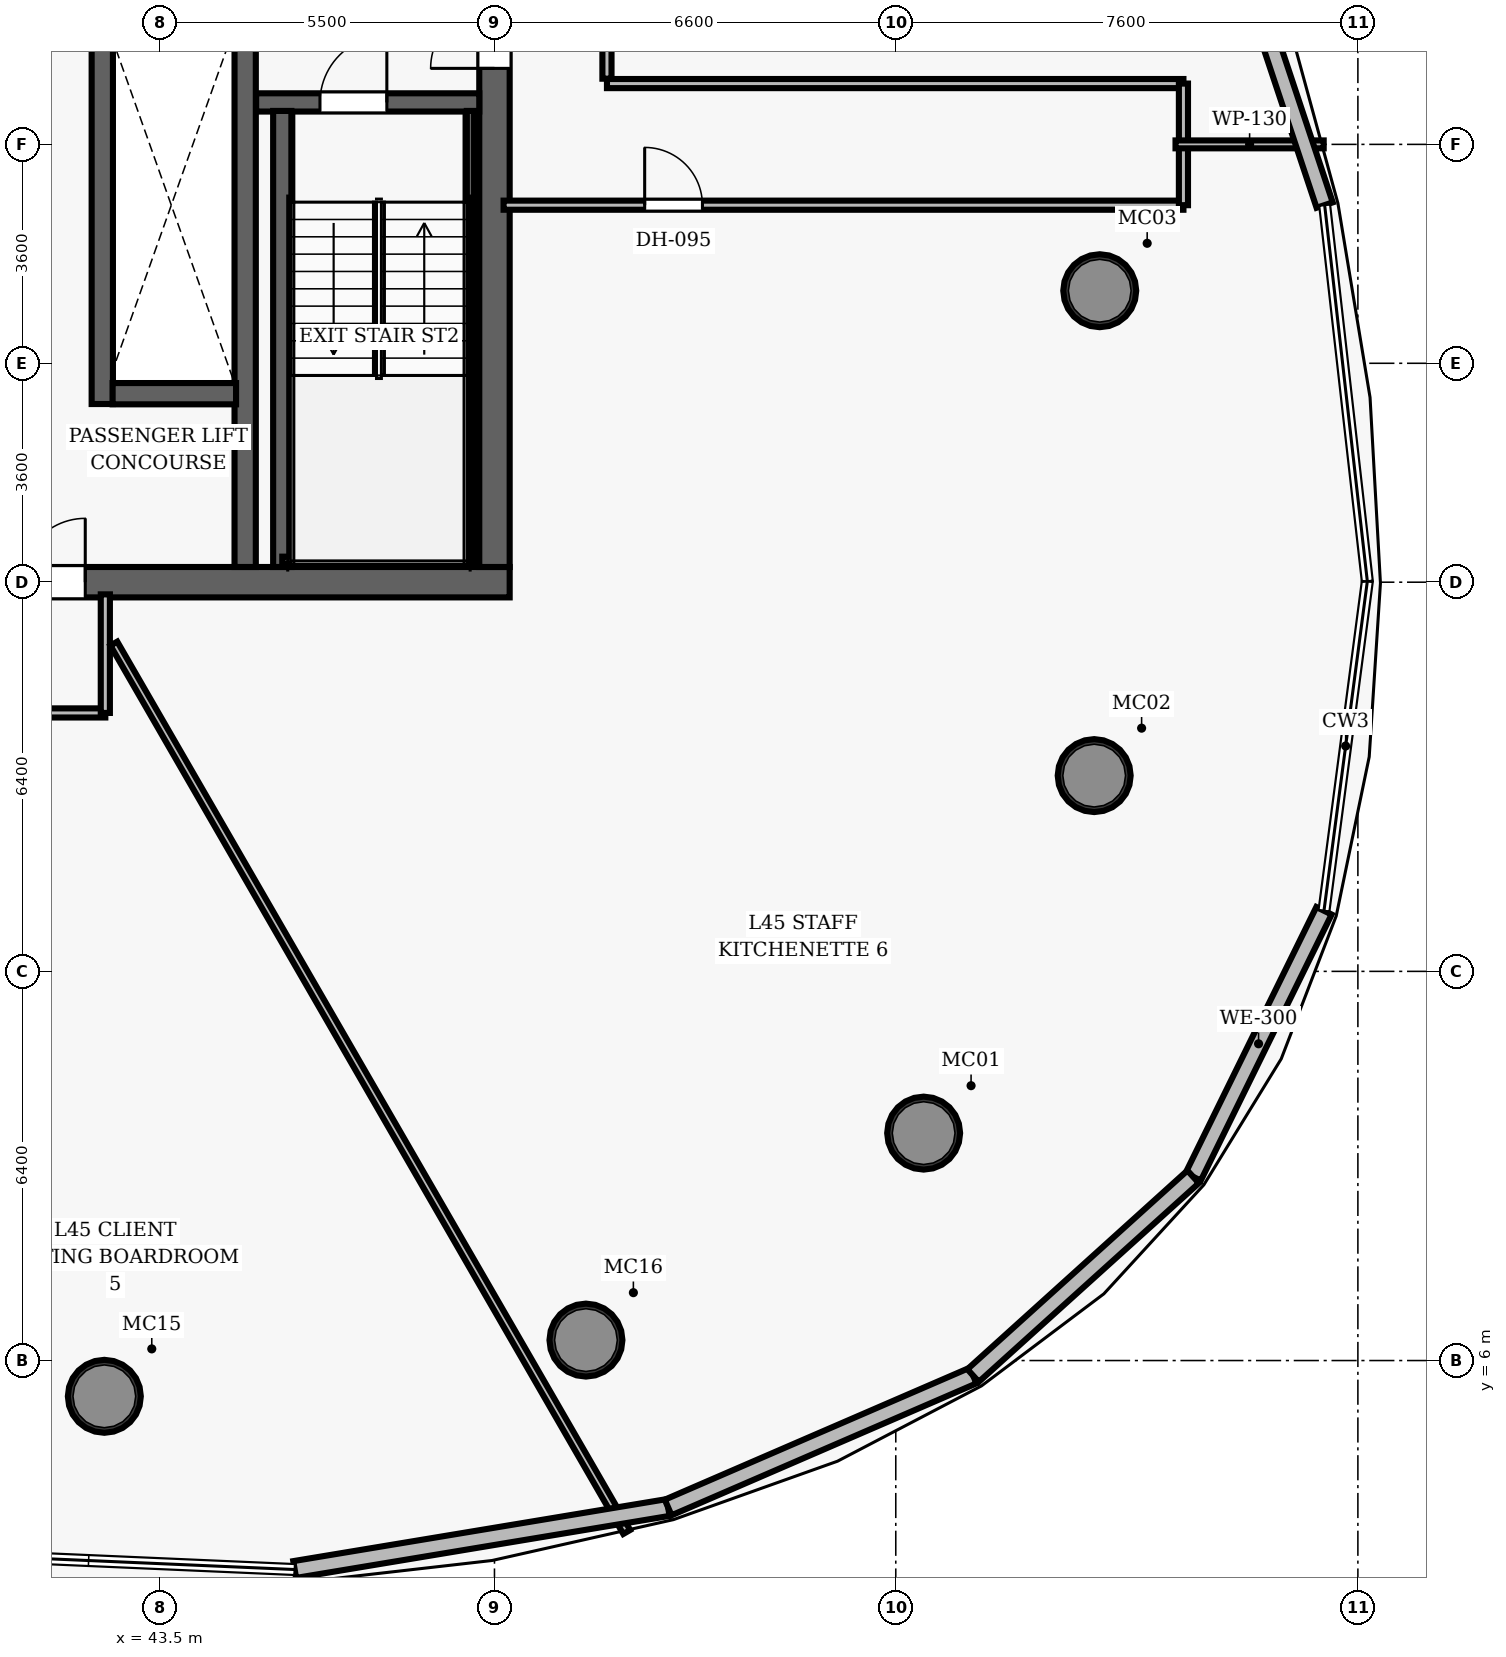
"""IFC4 building model, lengths in metres.
Left out: names, types, materials, properties, quantities, classifications, styles, units other than length and angle.
Written with IfcOpenShell. Run it as: python <this file> out.ifc"""

import sys

from ifc_helpers import new_model, si_unit, direction, frame, frame_2d, origin, origin_2d, place, context, subcontext, project, spatial, rectangle, hollow_circle, extrude, element, fill, save


model = new_model("IFC4")
c1 = context("Model", 3, precision=1e-05, world=origin(), true_north=direction((0.0, 1.0)))
c2 = subcontext(c1, "Body", "Model", "MODEL_VIEW")
j1 = project(units=[si_unit("LENGTHUNIT", "METRE"), si_unit("PLANEANGLEUNIT", "RADIAN")], contexts=[c1])
p1 = place(None, origin())
s1 = spatial("IfcSite", under=j1, at=p1, CompositionType="ELEMENT")
p2 = place(p1, origin())
s2 = spatial("IfcBuilding", under=s1, at=p2, CompositionType="ELEMENT")
p3 = place(p2, frame((0.0, 0.0, 178.9)))
s3 = spatial("IfcBuildingStorey", under=s2, at=p3, CompositionType="ELEMENT", Elevation=178.9)
p4 = place(p3, frame((26.75, 18.8, 0.0), z_axis=(0.0, 0.0, 1.0), x_axis=(1.0, 0.0, 0.0)))
e1 = element("IfcWall", 1, at=p4, inside=s3, PredefinedType="SHEAR", context=c2, shape_type="SweptSolid", body=[
    extrude(rectangle(XDim=22.5, YDim=0.5, at=frame_2d((11.25, 0.0))), origin(), (0.0, 0.0, 1.0), 3.85),
])
p5 = place(p4, frame((14.47, 0.0, 0.0)))
e2 = element("IfcOpeningElement", 2, at=p5, cuts=e1, PredefinedType="OPENING", context=c2, shape_type="SweptSolid", body=[
    extrude(rectangle(XDim=1.05, YDim=2.15, at=frame_2d((0.525, 1.075))), frame((0.0, 0.26, 0.0), z_axis=(0.0, -1.0, 0.0), x_axis=(1.0, 0.0, 0.0)), (0.0, 0.0, 1.0), 0.52),
])
p6 = place(p3, frame((49.0, 19.05, 0.0), z_axis=(0.0, 0.0, 1.0), x_axis=(0.0, 1.0, 0.0)))
e3 = element("IfcWall", 3, at=p6, inside=s3, PredefinedType="SHEAR", context=c2, shape_type="SweptSolid", body=[
    extrude(rectangle(XDim=13.9, YDim=0.5, at=frame_2d((6.95, 0.0))), origin(), (0.0, 0.0, 1.0), 3.85),
])
p7 = place(p6, frame((8.2, 0.0, 0.0)))
e4 = element("IfcOpeningElement", 4, at=p7, cuts=e3, PredefinedType="OPENING", context=c2, shape_type="SweptSolid", body=[
    extrude(rectangle(XDim=1.05, YDim=2.15, at=frame_2d((0.525, 1.075))), frame((0.0, 0.26, 0.0), z_axis=(0.0, -1.0, 0.0), x_axis=(1.0, 0.0, 0.0)), (0.0, 0.0, 1.0), 0.52),
])
p8 = place(p3, frame((44.9, 19.05, 0.0), z_axis=(0.0, 0.0, 1.0), x_axis=(0.0, 1.0, 0.0)))
e5 = element("IfcWall", 5, at=p8, inside=s3, PredefinedType="SHEAR", context=c2, shape_type="SweptSolid", body=[
    extrude(rectangle(XDim=13.9, YDim=0.35, at=frame_2d((6.95, 0.0))), origin(), (0.0, 0.0, 1.0), 3.85),
])
for number, where, z_axis, x_axis in (
    (6, (56.058, 9.74, 0.0), (0.0, 0.0, 1.0), (1.0, 0.0, 0.0)),
    (7, (58.863, 15.619, 0.0), (0.0, 0.0, 1.0), (1.0, 0.0, 0.0)),
    (8, (58.955, 23.594, 0.0), (0.0, 0.0, 1.0), (1.0, 0.0, 0.0)),
    (9, (42.584, 5.412, 0.0), (0.0, 0.0, 1.0), (1.0, 0.0, 0.0)),
    (10, (50.504, 6.336, 0.0), (0.0, 0.0, 1.0), (1.0, 0.0, 0.0)),
):
    element("IfcColumn", number, at=place(p3, frame(where, z_axis=z_axis, x_axis=x_axis)), inside=s3, PredefinedType="COLUMN", context=c2, shape_type="SweptSolid", body=[
        extrude(hollow_circle(Radius=0.6, WallThickness=0.05, at=origin_2d()), origin(), (0.0, 0.0, 1.0), 3.85),
    ])
p9 = place(p3, frame((45.08, 26.69, 0.0), z_axis=(0.0, 0.0, 1.0), x_axis=(1.0, 0.0, 0.0)))
e11 = element("IfcWall", 11, at=p9, inside=s3, PredefinedType="SHEAR", context=c2, shape_type="SweptSolid", body=[
    extrude(rectangle(XDim=3.67, YDim=0.3, at=frame_2d((1.835, 0.0))), origin(), (0.0, 0.0, 1.0), 3.85),
])
p10 = place(p9, frame((1.05, 0.0, 0.0)))
e12 = element("IfcOpeningElement", 12, at=p10, cuts=e11, PredefinedType="OPENING", context=c2, shape_type="SweptSolid", body=[
    extrude(rectangle(XDim=1.1, YDim=2.15, at=frame_2d((0.55, 1.075))), frame((0.0, 0.16, 0.0), z_axis=(0.0, -1.0, 0.0), x_axis=(1.0, 0.0, 0.0)), (0.0, 0.0, 1.0), 0.32),
])
p11 = place(p3, frame((45.51, 19.05, 0.0), z_axis=(0.0, 0.0, 1.0), x_axis=(0.0, 1.0, 0.0)))
e13 = element("IfcWall", 13, at=p11, inside=s3, PredefinedType="SHEAR", context=c2, shape_type="SweptSolid", body=[
    extrude(rectangle(XDim=7.5, YDim=0.3, at=frame_2d((3.75, 0.0))), origin(), (0.0, 0.0, 1.0), 3.85),
])
p12 = place(p3, frame((48.605, 19.1, 0.0), z_axis=(0.0, 0.0, 1.0), x_axis=(0.0, 1.0, 0.0)))
e14 = element("IfcWall", 14, at=p12, inside=s3, PredefinedType="SHEAR", context=c2, shape_type="SweptSolid", body=[
    extrude(rectangle(XDim=7.45, YDim=0.12, at=frame_2d((3.725, 0.0))), origin(), (0.0, 0.0, 1.0), 3.85),
])
p13 = place(p3, frame((45.51, 19.16, 0.0), z_axis=(0.0, 0.0, 1.0), x_axis=(1.0, 0.0, 0.0)))
e15 = element("IfcWall", 15, at=p13, inside=s3, PredefinedType="SHEAR", context=c2, shape_type="SweptSolid", body=[
    extrude(rectangle(XDim=3.095, YDim=0.12, at=frame_2d((1.547, 0.0))), origin(), (0.0, 0.0, 1.0), 3.85),
])
p14 = place(p3, frame((42.55, 21.73, 0.0), z_axis=(0.0, 0.0, 1.0), x_axis=(0.0, 1.0, 0.0)))
e16 = element("IfcWall", 16, at=p14, inside=s3, PredefinedType="SHEAR", context=c2, shape_type="SweptSolid", body=[
    extrude(rectangle(XDim=6.54, YDim=0.35, at=frame_2d((3.27, 0.0))), origin(), (0.0, 0.0, 1.0), 3.035),
])
p15 = place(p3, frame((42.72, 21.9, 0.0), z_axis=(0.0, 0.0, 1.0), x_axis=(1.0, 0.0, 0.0)))
e17 = element("IfcWall", 17, at=p15, inside=s3, PredefinedType="SHEAR", context=c2, shape_type="SweptSolid", body=[
    extrude(rectangle(XDim=2.03, YDim=0.35, at=frame_2d((1.015, 0.0))), origin(), (0.0, 0.0, 1.0), 3.035),
])
p16 = place(p3, frame((50.85, 27.08, 0.0), z_axis=(0.0, 0.0, 1.0), x_axis=(0.0, 1.0, 0.0)))
e18 = element("IfcWall", 18, at=p16, inside=s3, PredefinedType="PARTITIONING", context=c2, shape_type="SweptSolid", body=[
    extrude(rectangle(XDim=8.12, YDim=0.15, at=frame_2d((4.06, 0.0))), origin(), (0.0, 0.0, 1.0), 3.035),
])
p17 = place(p3, frame((50.85, 27.0, 0.0), z_axis=(0.0, 0.0, 1.0), x_axis=(1.0, 0.0, 0.0)))
e19 = element("IfcWall", 19, at=p17, inside=s3, PredefinedType="PARTITIONING", context=c2, shape_type="SweptSolid", body=[
    extrude(rectangle(XDim=9.481, YDim=0.15, at=frame_2d((4.74, 0.0))), origin(), (0.0, 0.0, 1.0), 3.035),
])
p18 = place(p3, frame((49.15, 25.0, 0.0), z_axis=(0.0, 0.0, 1.0), x_axis=(1.0, 0.0, 0.0)))
e20 = element("IfcWall", 20, at=p18, inside=s3, PredefinedType="PARTITIONING", context=c2, shape_type="SweptSolid", body=[
    extrude(rectangle(XDim=11.181, YDim=0.15, at=frame_2d((5.591, 0.0))), origin(), (0.0, 0.0, 1.0), 3.035),
])
p19 = place(p18, frame((2.32, 0.0, 0.0)))
e21 = element("IfcOpeningElement", 21, at=p19, cuts=e20, PredefinedType="OPENING", context=c2, shape_type="SweptSolid", body=[
    extrude(rectangle(XDim=0.95, YDim=2.15, at=frame_2d((0.475, 1.075))), frame((0.0, 0.085, 0.0), z_axis=(0.0, -1.0, 0.0), x_axis=(1.0, 0.0, 0.0)), (0.0, 0.0, 1.0), 0.17),
])
p20 = place(p3, frame((60.331, 25.0, 0.0), z_axis=(0.0, 0.0, 1.0), x_axis=(0.0, 1.0, 0.0)))
e22 = element("IfcWall", 22, at=p20, inside=s3, PredefinedType="PARTITIONING", context=c2, shape_type="SweptSolid", body=[
    extrude(rectangle(XDim=2.0, YDim=0.15, at=frame_2d((1.0, 0.0))), origin(), (0.0, 0.0, 1.0), 3.035),
])
p21 = place(p3, frame((39.05, 16.65, 0.0), z_axis=(0.0, 0.0, 1.0), x_axis=(1.0, 0.0, 0.0)))
e23 = element("IfcWall", 23, at=p21, inside=s3, PredefinedType="PARTITIONING", context=c2, shape_type="SweptSolid", body=[
    extrude(rectangle(XDim=3.55, YDim=0.15, at=frame_2d((1.775, 0.0))), origin(), (0.0, 0.0, 1.0), 3.035),
])
p22 = place(p3, frame((42.6, 16.65, 0.0), z_axis=(0.0, 0.0, 1.0), x_axis=(0.0, 1.0, 0.0)))
e24 = element("IfcWall", 24, at=p22, inside=s3, PredefinedType="PARTITIONING", context=c2, shape_type="SweptSolid", body=[
    extrude(rectangle(XDim=1.95, YDim=0.15, at=frame_2d((0.975, 0.0))), origin(), (0.0, 0.0, 1.0), 3.035),
])
p23 = place(p3, frame((60.201, 26.0, 0.0), z_axis=(0.0, 0.0, 1.0), x_axis=(1.0, 0.0, 0.0)))
e25 = element("IfcWall", 25, at=p23, inside=s3, PredefinedType="PARTITIONING", context=c2, shape_type="SweptSolid", body=[
    extrude(rectangle(XDim=2.437, YDim=0.13, at=frame_2d((1.219, 0.0))), origin(), (0.0, 0.0, 1.0), 3.035),
])
p24 = place(p3, frame((42.74, 17.79, 0.0), z_axis=(0.0, 0.0, 1.0), x_axis=(0.500003906344, -0.866023148444, 0.0)))
e26 = element("IfcWall", 26, at=p24, inside=s3, PredefinedType="PARTITIONING", context=c2, shape_type="SweptSolid", body=[
    extrude(rectangle(XDim=16.869, YDim=0.13, at=frame_2d((8.435, 0.0))), origin(), (0.0, 0.0, 1.0), 3.035),
])
p25 = place(p3, frame((62.642, 13.397, 0.0), z_axis=(0.0, 0.0, 1.0), x_axis=(-0.441235718271, -0.897391241835, 0.0)))
e27 = element("IfcWall", 27, at=p25, inside=s3, PredefinedType="SOLIDWALL", context=c2, shape_type="SweptSolid", body=[
    extrude(rectangle(XDim=4.876, YDim=0.28, at=frame_2d((2.438, 0.0))), origin(), (0.0, 0.0, 1.0), 3.62),
])
p26 = place(p3, frame((60.512, 31.439, 0.0), z_axis=(0.0, 0.0, 1.0), x_axis=(0.315590755591, -0.948895397283, 0.0)))
e28 = element("IfcWall", 28, at=p26, inside=s3, PredefinedType="SOLIDWALL", context=c2, shape_type="SweptSolid", body=[
    extrude(rectangle(XDim=6.784, YDim=0.28, at=frame_2d((3.392, 0.0))), origin(), (0.0, 0.0, 1.0), 3.62),
])
p27 = place(p3, frame((51.856, 3.583, 0.0), z_axis=(0.0, 0.0, 1.0), x_axis=(-0.986490190097, -0.163820343186, 0.0)))
e29 = element("IfcWall", 29, at=p27, inside=s3, PredefinedType="SOLIDWALL", context=c2, shape_type="SweptSolid", body=[
    extrude(rectangle(XDim=6.227, YDim=0.28, at=frame_2d((3.113, 0.0))), origin(), (0.0, 0.0, 1.0), 3.62),
])
p28 = place(p3, frame((56.872, 5.753, 0.0), z_axis=(0.0, 0.0, 1.0), x_axis=(-0.917776074032, -0.397098322753, 0.0)))
e30 = element("IfcWall", 30, at=p28, inside=s3, PredefinedType="SOLIDWALL", context=c2, shape_type="SweptSolid", body=[
    extrude(rectangle(XDim=5.464, YDim=0.28, at=frame_2d((2.732, 0.0))), origin(), (0.0, 0.0, 1.0), 3.62),
])
p29 = place(p3, frame((60.491, 9.021, 0.0), z_axis=(0.0, 0.0, 1.0), x_axis=(-0.742187793078, -0.670191972352, 0.0)))
e31 = element("IfcWall", 31, at=p29, inside=s3, PredefinedType="SOLIDWALL", context=c2, shape_type="SweptSolid", body=[
    extrude(rectangle(XDim=4.876, YDim=0.28, at=frame_2d((2.438, 0.0))), origin(), (0.0, 0.0, 1.0), 3.62),
])
p30 = place(p10, origin())
e32 = element("IfcDoor", 32, at=p30, inside=s3, OperationType="SINGLE_SWING_RIGHT", PredefinedType="DOOR", context=c2, shape_type="SweptSolid", body=[
    extrude(rectangle(XDim=1.1, YDim=2.15, at=frame_2d((0.55, 1.075))), frame((0.0, 0.025, 0.0), z_axis=(0.0, -1.0, 0.0), x_axis=(1.0, 0.0, 0.0)), (0.0, 0.0, 1.0), 0.05),
])
fill(e12, e32)
p31 = place(p7, origin())
e33 = element("IfcDoor", 33, at=p31, inside=s3, OperationType="SINGLE_SWING_LEFT", PredefinedType="DOOR", context=c2, shape_type="SweptSolid", body=[
    extrude(rectangle(XDim=1.05, YDim=2.15, at=frame_2d((0.525, 1.075))), frame((0.0, 0.025, 0.0), z_axis=(0.0, -1.0, 0.0), x_axis=(1.0, 0.0, 0.0)), (0.0, 0.0, 1.0), 0.05),
])
fill(e4, e33)
p32 = place(p5, origin())
e34 = element("IfcDoor", 34, at=p32, inside=s3, OperationType="SINGLE_SWING_RIGHT", PredefinedType="DOOR", context=c2, shape_type="SweptSolid", body=[
    extrude(rectangle(XDim=1.05, YDim=2.15, at=frame_2d((0.525, 1.075))), frame((0.0, 0.025, 0.0), z_axis=(0.0, -1.0, 0.0), x_axis=(1.0, 0.0, 0.0)), (0.0, 0.0, 1.0), 0.05),
])
fill(e2, e34)
p33 = place(p19, origin())
e35 = element("IfcDoor", 35, at=p33, inside=s3, OperationType="SINGLE_SWING_LEFT", PredefinedType="DOOR", context=c2, shape_type="SweptSolid", body=[
    extrude(rectangle(XDim=0.95, YDim=2.15, at=frame_2d((0.475, 1.075))), frame((0.0, 0.025, 0.0), z_axis=(0.0, -1.0, 0.0), x_axis=(1.0, 0.0, 0.0)), (0.0, 0.0, 1.0), 0.05),
])
fill(e21, e35)
save(model, sys.argv[1])
